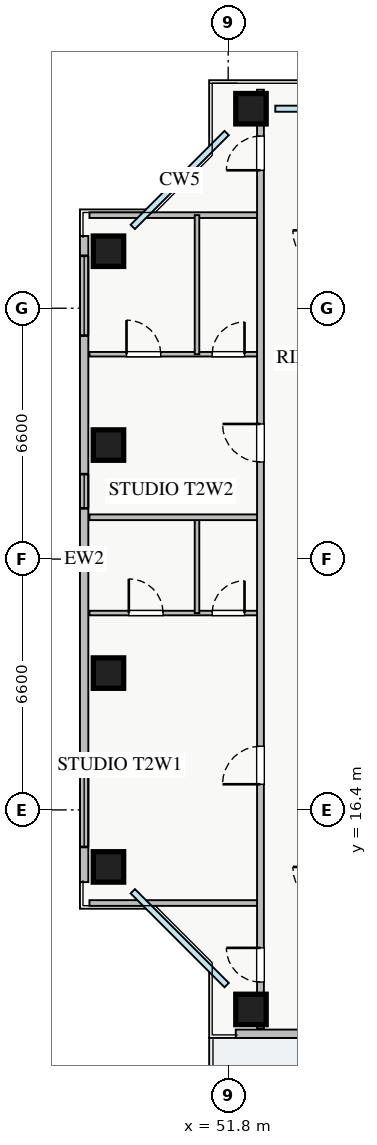
"""IFC4 building model, lengths in metres.
Left out: names, types, materials, properties, quantities, classifications, styles, units other than length and angle.
Written with IfcOpenShell. Run it as: python <this file> out.ifc"""

import sys

from ifc_helpers import new_model, si_unit, direction, frame, frame_2d, origin, origin_2d, place, context, subcontext, project, spatial, rectangle, extrude, source, transform, mapped, element, fill, save


model = new_model("IFC4")
c1 = context("Model", 3, precision=1e-05, world=origin(), true_north=direction((0.0, 1.0)))
c2 = subcontext(c1, "Body", "Model", "MODEL_VIEW")
j1 = project(units=[si_unit("LENGTHUNIT", "METRE"), si_unit("PLANEANGLEUNIT", "RADIAN")], contexts=[c1])
p1 = place(None, origin())
s1 = spatial("IfcSite", under=j1, at=p1, CompositionType="ELEMENT")
p2 = place(p1, origin())
s2 = spatial("IfcBuilding", under=s1, at=p2, CompositionType="ELEMENT")
p3 = place(p2, frame((0.0, 0.0, 69.75)))
s3 = spatial("IfcBuildingStorey", under=s2, at=p3, CompositionType="ELEMENT", Elevation=69.75)
m1 = source(origin(), c2, "Body", "SweptSolid", [
    extrude(rectangle(XDim=0.8, YDim=0.8, at=origin_2d()), origin(), (0.0, 0.0, 1.0), 3.25),
])
for number, where, z_axis, x_axis in (
    (1, (52.4, 11.15, 0.0), (0.0, 0.0, 1.0), (1.0, 0.0, 0.0)),
    (2, (52.4, 34.85, 0.0), (0.0, 0.0, 1.0), (1.0, 0.0, 0.0)),
    (3, (48.65, 14.9, 0.0), (0.0, 0.0, 1.0), (1.0, 0.0, 0.0)),
    (4, (48.65, 20.0, 0.0), (0.0, 0.0, 1.0), (1.0, 0.0, 0.0)),
    (5, (48.65, 26.0, 0.0), (0.0, 0.0, 1.0), (1.0, 0.0, 0.0)),
    (6, (48.65, 31.1, 0.0), (0.0, 0.0, 1.0), (1.0, 0.0, 0.0)),
):
    element("IfcColumn", number, at=place(p3, frame(where, z_axis=z_axis, x_axis=x_axis)), inside=s3, PredefinedType="COLUMN", context=c2, shape_type="MappedRepresentation", body=[
        mapped(m1, transform((0.0, 0.0, 0.0), x_axis=(1.0, 0.0, 0.0), y_axis=(0.0, 1.0, 0.0), z_axis=(0.0, 0.0, 1.0), scale=1.0)),
    ])
p4 = place(p3, frame((52.0, 10.51, 0.0), z_axis=(0.0, 0.0, 1.0), x_axis=(1.0, 0.0, 0.0)))
e7 = element("IfcWall", 7, at=p4, inside=s3, PredefinedType="STANDARD", context=c2, shape_type="SweptSolid", body=[
    extrude(rectangle(XDim=17.0, YDim=0.22, at=frame_2d((8.5, 0.0))), origin(), (0.0, 0.0, 1.0), 2.61),
])
p5 = place(p4, frame((7.9, 0.0, 0.0)))
e8 = element("IfcOpeningElement", 8, at=p5, cuts=e7, PredefinedType="OPENING", context=c2, shape_type="SweptSolid", body=[
    extrude(rectangle(XDim=1.2, YDim=2.1, at=frame_2d((0.6, 1.05))), frame((0.0, 0.12, 0.0), z_axis=(0.0, -1.0, 0.0), x_axis=(1.0, 0.0, 0.0)), (0.0, 0.0, 1.0), 0.24),
])
p6 = place(p3, frame((48.01, 14.5, 0.0), z_axis=(0.0, 0.0, 1.0), x_axis=(0.0, 1.0, 0.0)))
e9 = element("IfcWall", 9, at=p6, inside=s3, PredefinedType="STANDARD", context=c2, shape_type="SweptSolid", body=[
    extrude(rectangle(XDim=17.0, YDim=0.22, at=frame_2d((8.5, 0.0))), origin(), (0.0, 0.0, 1.0), 2.61),
])
p7 = place(p6, frame((0.925, 0.0, 0.9)))
e10 = element("IfcOpeningElement", 10, at=p7, cuts=e9, PredefinedType="OPENING", context=c2, shape_type="SweptSolid", body=[
    extrude(rectangle(XDim=2.4, YDim=1.48, at=frame_2d((1.2, 0.74))), frame((0.0, 0.12, 0.0), z_axis=(0.0, -1.0, 0.0), x_axis=(1.0, 0.0, 0.0)), (0.0, 0.0, 1.0), 0.24),
])
p8 = place(p6, frame((14.38, 0.0, 0.9)))
e11 = element("IfcOpeningElement", 11, at=p8, cuts=e9, PredefinedType="OPENING", context=c2, shape_type="SweptSolid", body=[
    extrude(rectangle(XDim=2.1, YDim=1.5, at=frame_2d((1.05, 0.75))), frame((0.0, 0.12, 0.0), z_axis=(0.0, -1.0, 0.0), x_axis=(1.0, 0.0, 0.0)), (0.0, 0.0, 1.0), 0.24),
])
p9 = place(p6, frame((9.835, 0.0, 0.9)))
e12 = element("IfcOpeningElement", 12, at=p9, cuts=e9, PredefinedType="OPENING", context=c2, shape_type="SweptSolid", body=[
    extrude(rectangle(XDim=0.9, YDim=1.2, at=frame_2d((0.45, 0.6))), frame((0.0, 0.12, 0.0), z_axis=(0.0, -1.0, 0.0), x_axis=(1.0, 0.0, 0.0)), (0.0, 0.0, 1.0), 0.24),
])
for number, where, z_axis, x_axis in (
    (13, (48.15, 32.05, 0.0), (0.0, 0.0, 1.0), (1.0, 0.0, 0.0)),
    (14, (48.15, 13.95, 0.0), (0.0, 0.0, 1.0), (1.0, 0.0, 0.0)),
):
    element("IfcWall", number, at=place(p3, frame(where, z_axis=z_axis, x_axis=x_axis)), inside=s3, PredefinedType="PARTITIONING", context=c2, shape_type="SweptSolid", body=[
        extrude(rectangle(XDim=4.5, YDim=0.15, at=frame_2d((2.25, 0.0))), origin(), (0.0, 0.0, 1.0), 3.07),
    ])
p10 = place(p3, frame((48.15, 21.58, 0.0), z_axis=(0.0, 0.0, 1.0), x_axis=(1.0, 0.0, 0.0)))
e15 = element("IfcWall", 15, at=p10, inside=s3, PredefinedType="PLUMBINGWALL", context=c2, shape_type="SweptSolid", body=[
    extrude(rectangle(XDim=4.5, YDim=0.12, at=frame_2d((2.25, 0.0))), origin(), (0.0, 0.0, 1.0), 3.07),
])
p11 = place(p10, frame((1.036, 0.0, 0.0)))
e16 = element("IfcOpeningElement", 16, at=p11, cuts=e15, PredefinedType="OPENING", context=c2, shape_type="SweptSolid", body=[
    extrude(rectangle(XDim=0.9, YDim=2.05, at=frame_2d((0.45, 1.025))), frame((0.0, 0.07, 0.0), z_axis=(0.0, -1.0, 0.0), x_axis=(1.0, 0.0, 0.0)), (0.0, 0.0, 1.0), 0.14),
])
p12 = place(p10, frame((3.23, 0.0, 0.0)))
e17 = element("IfcOpeningElement", 17, at=p12, cuts=e15, PredefinedType="OPENING", context=c2, shape_type="SweptSolid", body=[
    extrude(rectangle(XDim=0.85, YDim=2.05, at=frame_2d((0.425, 1.025))), frame((0.0, 0.07, 0.0), z_axis=(0.0, -1.0, 0.0), x_axis=(1.0, 0.0, 0.0)), (0.0, 0.0, 1.0), 0.14),
])
p13 = place(p3, frame((50.98, 21.58, 0.0), z_axis=(0.0, 0.0, 1.0), x_axis=(0.0, 1.0, 0.0)))
e18 = element("IfcWall", 18, at=p13, inside=s3, PredefinedType="PLUMBINGWALL", context=c2, shape_type="SweptSolid", body=[
    extrude(rectangle(XDim=2.52, YDim=0.12, at=frame_2d((1.26, 0.0))), origin(), (0.0, 0.0, 1.0), 3.07),
])
p14 = place(p3, frame((48.15, 28.39, 0.0), z_axis=(0.0, 0.0, 1.0), x_axis=(1.0, 0.0, 0.0)))
e19 = element("IfcWall", 19, at=p14, inside=s3, PredefinedType="PLUMBINGWALL", context=c2, shape_type="SweptSolid", body=[
    extrude(rectangle(XDim=4.5, YDim=0.12, at=frame_2d((2.25, 0.0))), origin(), (0.0, 0.0, 1.0), 3.07),
])
p15 = place(p14, frame((0.975, 0.0, 0.0)))
e20 = element("IfcOpeningElement", 20, at=p15, cuts=e19, PredefinedType="OPENING", context=c2, shape_type="SweptSolid", body=[
    extrude(rectangle(XDim=0.9, YDim=2.05, at=frame_2d((0.45, 1.025))), frame((0.0, 0.07, 0.0), z_axis=(0.0, -1.0, 0.0), x_axis=(1.0, 0.0, 0.0)), (0.0, 0.0, 1.0), 0.14),
])
p16 = place(p14, frame((3.23, 0.0, 0.0)))
e21 = element("IfcOpeningElement", 21, at=p16, cuts=e19, PredefinedType="OPENING", context=c2, shape_type="SweptSolid", body=[
    extrude(rectangle(XDim=0.85, YDim=2.05, at=frame_2d((0.425, 1.025))), frame((0.0, 0.07, 0.0), z_axis=(0.0, -1.0, 0.0), x_axis=(1.0, 0.0, 0.0)), (0.0, 0.0, 1.0), 0.14),
])
p17 = place(p3, frame((50.98, 28.39, 0.0), z_axis=(0.0, 0.0, 1.0), x_axis=(0.0, 1.0, 0.0)))
e22 = element("IfcWall", 22, at=p17, inside=s3, PredefinedType="PLUMBINGWALL", context=c2, shape_type="SweptSolid", body=[
    extrude(rectangle(XDim=3.66, YDim=0.12, at=frame_2d((1.83, 0.0))), origin(), (0.0, 0.0, 1.0), 3.07),
])
p18 = place(p3, frame((48.15, 24.1, 0.0), z_axis=(0.0, 0.0, 1.0), x_axis=(1.0, 0.0, 0.0)))
e23 = element("IfcWall", 23, at=p18, inside=s3, PredefinedType="PARTITIONING", context=c2, shape_type="SweptSolid", body=[
    extrude(rectangle(XDim=4.5, YDim=0.15, at=frame_2d((2.25, 0.0))), origin(), (0.0, 0.0, 1.0), 3.07),
])
p19 = place(p3, frame((52.65, 10.65, 0.0), z_axis=(0.0, 0.0, 1.0), x_axis=(0.0, 1.0, 0.0)))
e24 = element("IfcWall", 24, at=p19, inside=s3, PredefinedType="PARTITIONING", context=c2, shape_type="SweptSolid", body=[
    extrude(rectangle(XDim=24.7, YDim=0.18, at=frame_2d((12.35, 0.0))), origin(), (0.0, 0.0, 1.0), 2.615),
])
p20 = place(p19, frame((22.58, 0.0, 0.0)))
e25 = element("IfcOpeningElement", 25, at=p20, cuts=e24, PredefinedType="OPENING", context=c2, shape_type="SweptSolid", body=[
    extrude(rectangle(XDim=0.9, YDim=2.05, at=frame_2d((0.45, 1.025))), frame((0.0, 0.1, 0.0), z_axis=(0.0, -1.0, 0.0), x_axis=(1.0, 0.0, 0.0)), (0.0, 0.0, 1.0), 0.2),
])
p21 = place(p19, frame((1.22, 0.0, 0.0)))
e26 = element("IfcOpeningElement", 26, at=p21, cuts=e24, PredefinedType="OPENING", context=c2, shape_type="SweptSolid", body=[
    extrude(rectangle(XDim=0.9, YDim=2.05, at=frame_2d((0.45, 1.025))), frame((0.0, 0.1, 0.0), z_axis=(0.0, -1.0, 0.0), x_axis=(1.0, 0.0, 0.0)), (0.0, 0.0, 1.0), 0.2),
])
p22 = place(p19, frame((6.425, 0.0, 0.0)))
e27 = element("IfcOpeningElement", 27, at=p22, cuts=e24, PredefinedType="OPENING", context=c2, shape_type="SweptSolid", body=[
    extrude(rectangle(XDim=1.0, YDim=2.05, at=frame_2d((0.5, 1.025))), frame((0.0, 0.1, 0.0), z_axis=(0.0, -1.0, 0.0), x_axis=(1.0, 0.0, 0.0)), (0.0, 0.0, 1.0), 0.2),
])
p23 = place(p19, frame((14.905, 0.0, 0.0)))
e28 = element("IfcOpeningElement", 28, at=p23, cuts=e24, PredefinedType="OPENING", context=c2, shape_type="SweptSolid", body=[
    extrude(rectangle(XDim=1.0, YDim=2.05, at=frame_2d((0.5, 1.025))), frame((0.0, 0.1, 0.0), z_axis=(0.0, -1.0, 0.0), x_axis=(1.0, 0.0, 0.0)), (0.0, 0.0, 1.0), 0.2),
])
m2 = source(origin(), c2, "Body", "SweptSolid", [
    extrude(rectangle(XDim=2.4, YDim=1.48, at=frame_2d((1.2, 0.74))), frame((0.0, 0.03, 0.0), z_axis=(0.0, -1.0, 0.0), x_axis=(1.0, 0.0, 0.0)), (0.0, 0.0, 1.0), 0.06),
])
p24 = place(p7, origin())
e29 = element("IfcWindow", 29, at=p24, inside=s3, PartitioningType="TRIPLE_PANEL_VERTICAL", PredefinedType="WINDOW", context=c2, shape_type="MappedRepresentation", body=[
    mapped(m2, transform((0.0, 0.0, 0.0), x_axis=(1.0, 0.0, 0.0), y_axis=(0.0, 1.0, 0.0), z_axis=(0.0, 0.0, 1.0), scale=1.0)),
])
fill(e10, e29)
m3 = source(origin(), c2, "Body", "SweptSolid", [
    extrude(rectangle(XDim=2.1, YDim=1.5, at=frame_2d((1.05, 0.75))), frame((0.0, 0.03, 0.0), z_axis=(0.0, -1.0, 0.0), x_axis=(1.0, 0.0, 0.0)), (0.0, 0.0, 1.0), 0.06),
])
p25 = place(p8, origin())
e30 = element("IfcWindow", 30, at=p25, inside=s3, PartitioningType="TRIPLE_PANEL_VERTICAL", PredefinedType="WINDOW", context=c2, shape_type="MappedRepresentation", body=[
    mapped(m3, transform((0.0, 0.0, 0.0), x_axis=(1.0, 0.0, 0.0), y_axis=(0.0, 1.0, 0.0), z_axis=(0.0, 0.0, 1.0), scale=1.0)),
])
fill(e11, e30)
m4 = source(origin(), c2, "Body", "SweptSolid", [
    extrude(rectangle(XDim=0.9, YDim=2.05, at=frame_2d((0.45, 1.025))), frame((0.0, 0.025, 0.0), z_axis=(0.0, -1.0, 0.0), x_axis=(1.0, 0.0, 0.0)), (0.0, 0.0, 1.0), 0.05),
])
p26 = place(p11, origin())
e31 = element("IfcDoor", 31, at=p26, inside=s3, OperationType="SINGLE_SWING_LEFT", PredefinedType="DOOR", context=c2, shape_type="MappedRepresentation", body=[
    mapped(m4, transform((0.0, 0.0, 0.0), x_axis=(1.0, 0.0, 0.0), y_axis=(0.0, 1.0, 0.0), z_axis=(0.0, 0.0, 1.0), scale=1.0)),
])
fill(e16, e31)
m5 = source(origin(), c2, "Body", "SweptSolid", [
    extrude(rectangle(XDim=0.85, YDim=2.05, at=frame_2d((0.425, 1.025))), frame((0.0, 0.025, 0.0), z_axis=(0.0, -1.0, 0.0), x_axis=(1.0, 0.0, 0.0)), (0.0, 0.0, 1.0), 0.05),
])
p27 = place(p12, origin())
e32 = element("IfcDoor", 32, at=p27, inside=s3, OperationType="SINGLE_SWING_RIGHT", PredefinedType="DOOR", context=c2, shape_type="MappedRepresentation", body=[
    mapped(m5, transform((0.0, 0.0, 0.0), x_axis=(1.0, 0.0, 0.0), y_axis=(0.0, 1.0, 0.0), z_axis=(0.0, 0.0, 1.0), scale=1.0)),
])
fill(e17, e32)
p28 = place(p15, origin())
e33 = element("IfcDoor", 33, at=p28, inside=s3, OperationType="SINGLE_SWING_LEFT", PredefinedType="DOOR", context=c2, shape_type="MappedRepresentation", body=[
    mapped(m4, transform((0.0, 0.0, 0.0), x_axis=(1.0, 0.0, 0.0), y_axis=(0.0, 1.0, 0.0), z_axis=(0.0, 0.0, 1.0), scale=1.0)),
])
fill(e20, e33)
p29 = place(p16, origin())
e34 = element("IfcDoor", 34, at=p29, inside=s3, OperationType="SINGLE_SWING_RIGHT", PredefinedType="DOOR", context=c2, shape_type="MappedRepresentation", body=[
    mapped(m5, transform((0.0, 0.0, 0.0), x_axis=(1.0, 0.0, 0.0), y_axis=(0.0, 1.0, 0.0), z_axis=(0.0, 0.0, 1.0), scale=1.0)),
])
fill(e21, e34)
p30 = place(p20, origin())
e35 = element("IfcDoor", 35, at=p30, inside=s3, OperationType="SINGLE_SWING_LEFT", PredefinedType="DOOR", context=c2, shape_type="MappedRepresentation", body=[
    mapped(m4, transform((0.0, 0.0, 0.0), x_axis=(1.0, 0.0, 0.0), y_axis=(0.0, 1.0, 0.0), z_axis=(0.0, 0.0, 1.0), scale=1.0)),
])
fill(e25, e35)
p31 = place(p21, origin())
e36 = element("IfcDoor", 36, at=p31, inside=s3, OperationType="SINGLE_SWING_RIGHT", PredefinedType="DOOR", context=c2, shape_type="MappedRepresentation", body=[
    mapped(m4, transform((0.0, 0.0, 0.0), x_axis=(1.0, 0.0, 0.0), y_axis=(0.0, 1.0, 0.0), z_axis=(0.0, 0.0, 1.0), scale=1.0)),
])
fill(e26, e36)
m6 = source(origin(), c2, "Body", "SweptSolid", [
    extrude(rectangle(XDim=1.0, YDim=2.05, at=frame_2d((0.5, 1.025))), frame((0.0, 0.025, 0.0), z_axis=(0.0, -1.0, 0.0), x_axis=(1.0, 0.0, 0.0)), (0.0, 0.0, 1.0), 0.05),
])
p32 = place(p22, origin())
e37 = element("IfcDoor", 37, at=p32, inside=s3, OperationType="SINGLE_SWING_LEFT", PredefinedType="DOOR", context=c2, shape_type="MappedRepresentation", body=[
    mapped(m6, transform((0.0, 0.0, 0.0), x_axis=(1.0, 0.0, 0.0), y_axis=(0.0, 1.0, 0.0), z_axis=(0.0, 0.0, 1.0), scale=1.0)),
])
fill(e27, e37)
p33 = place(p23, origin())
e38 = element("IfcDoor", 38, at=p33, inside=s3, OperationType="SINGLE_SWING_RIGHT", PredefinedType="DOOR", context=c2, shape_type="MappedRepresentation", body=[
    mapped(m6, transform((0.0, 0.0, 0.0), x_axis=(1.0, 0.0, 0.0), y_axis=(0.0, 1.0, 0.0), z_axis=(0.0, 0.0, 1.0), scale=1.0)),
])
fill(e28, e38)
m7 = source(origin(), c2, "Body", "SweptSolid", [
    extrude(rectangle(XDim=0.9, YDim=1.2, at=frame_2d((0.45, 0.6))), frame((0.0, 0.03, 0.0), z_axis=(0.0, -1.0, 0.0), x_axis=(1.0, 0.0, 0.0)), (0.0, 0.0, 1.0), 0.06),
])
p34 = place(p9, origin())
e39 = element("IfcWindow", 39, at=p34, inside=s3, PartitioningType="SINGLE_PANEL", PredefinedType="WINDOW", context=c2, shape_type="MappedRepresentation", body=[
    mapped(m7, transform((0.0, 0.0, 0.0), x_axis=(1.0, 0.0, 0.0), y_axis=(0.0, 1.0, 0.0), z_axis=(0.0, 0.0, 1.0), scale=1.0)),
])
fill(e12, e39)
save(model, sys.argv[1])
